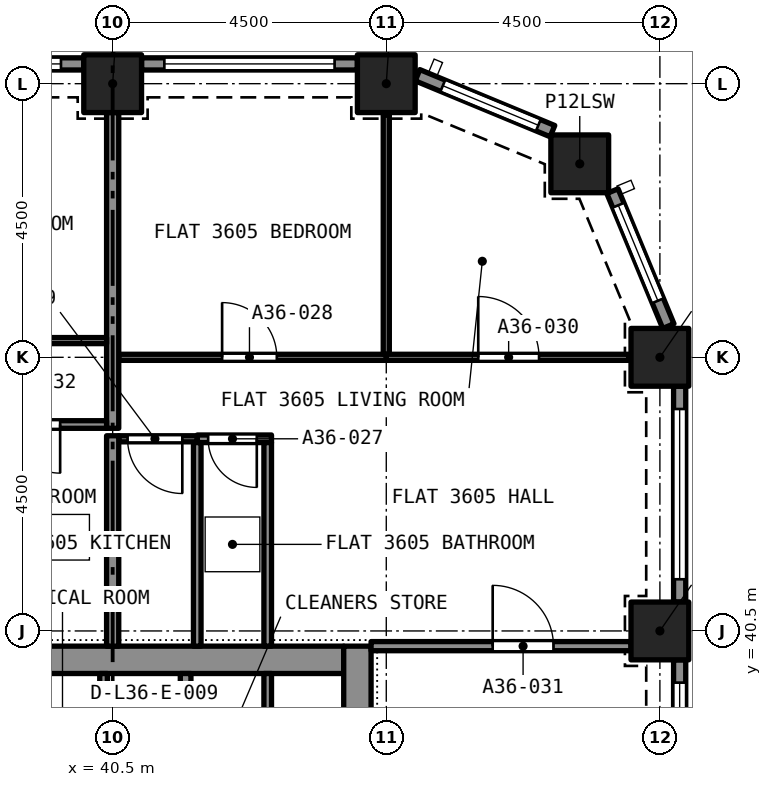
"""IFC4 building model, lengths in metres.
Left out: names, types, materials, properties, quantities, classifications, styles, units other than length and angle.
Written with IfcOpenShell. Run it as: python <this file> out.ifc"""

import sys

from ifc_helpers import new_model, si_unit, direction, frame, frame_2d, origin, origin_2d, place, context, subcontext, project, spatial, rectangle, extrude, element, fill, save


model = new_model("IFC4")
c1 = context("Model", 3, precision=1e-05, world=origin(), true_north=direction((0.0, 1.0)))
c2 = subcontext(c1, "Body", "Model", "MODEL_VIEW")
j1 = project(units=[si_unit("LENGTHUNIT", "METRE"), si_unit("PLANEANGLEUNIT", "RADIAN")], contexts=[c1])
p1 = place(None, origin())
s1 = spatial("IfcSite", under=j1, at=p1, CompositionType="ELEMENT")
p2 = place(p1, origin())
s2 = spatial("IfcBuilding", under=s1, at=p2, CompositionType="ELEMENT")
p3 = place(p2, frame((0.0, 0.0, 130.2)))
s3 = spatial("IfcBuildingStorey", under=s2, at=p3, CompositionType="ELEMENT", Elevation=130.2)
for number, where, z_axis, x_axis in (
    (1, (49.5, 40.5, 0.0), (0.0, 0.0, 1.0), (1.0, 0.0, 0.0)),
    (2, (49.5, 45.0, 0.0), (0.0, 0.0, 1.0), (1.0, 0.0, 0.0)),
    (3, (48.182, 48.182, 0.0), (0.0, 0.0, 1.0), (1.0, 0.0, 0.0)),
    (4, (40.5, 49.5, 0.0), (0.0, 0.0, 1.0), (1.0, 0.0, 0.0)),
    (5, (45.0, 49.5, 0.0), (0.0, 0.0, 1.0), (1.0, 0.0, 0.0)),
):
    element("IfcColumn", number, at=place(p3, frame(where, z_axis=z_axis, x_axis=x_axis)), inside=s3, PredefinedType="COLUMN", context=c2, shape_type="SweptSolid", body=[
        extrude(rectangle(XDim=0.95, YDim=0.95, at=origin_2d()), origin(), (0.0, 0.0, 1.0), 3.2),
    ])
p4 = place(p3, frame((36.7, 40.025, 0.0), z_axis=(0.0, 0.0, 1.0), x_axis=(1.0, 0.0, 0.0)))
e6 = element("IfcWall", 6, at=p4, inside=s3, PredefinedType="SOLIDWALL", context=c2, shape_type="SweptSolid", body=[
    extrude(rectangle(XDim=7.6, YDim=0.45, at=frame_2d((3.8, 0.0))), origin(), (0.0, 0.0, 1.0), 3.2),
])
p5 = place(p3, frame((44.525, 27.25, 0.0), z_axis=(0.0, 0.0, 1.0), x_axis=(0.0, 1.0, 0.0)))
e7 = element("IfcWall", 7, at=p5, inside=s3, PredefinedType="SOLIDWALL", context=c2, shape_type="SweptSolid", body=[
    extrude(rectangle(XDim=13.0, YDim=0.45, at=frame_2d((6.5, 0.0))), origin(), (0.0, 0.0, 1.0), 3.2),
])
p6 = place(p5, frame((8.7, 0.0, 0.0)))
e8 = element("IfcOpeningElement", 8, at=p6, cuts=e7, PredefinedType="OPENING", context=c2, shape_type="SweptSolid", body=[
    extrude(rectangle(XDim=1.2, YDim=2.1, at=frame_2d((0.6, 1.05))), frame((0.0, 0.235, 0.0), z_axis=(0.0, -1.0, 0.0), x_axis=(1.0, 0.0, 0.0)), (0.0, 0.0, 1.0), 0.47),
])
p7 = place(p3, frame((49.825, 40.025, 0.0), z_axis=(0.0, 0.0, 1.0), x_axis=(0.0, -1.0, 0.0)))
e9 = element("IfcWall", 9, at=p7, inside=s3, PredefinedType="SOLIDWALL", context=c2, shape_type="SweptSolid", body=[
    extrude(rectangle(XDim=3.55, YDim=0.2, at=frame_2d((1.775, 0.0))), origin(), (0.0, 0.0, 1.0), 3.2),
])
p8 = place(p7, frame((0.375, 0.0, 0.45)))
e10 = element("IfcOpeningElement", 10, at=p8, cuts=e9, PredefinedType="OPENING", context=c2, shape_type="SweptSolid", body=[
    extrude(rectangle(XDim=2.8, YDim=1.95, at=frame_2d((1.4, 0.975))), frame((0.0, 0.11, 0.0), z_axis=(0.0, -1.0, 0.0), x_axis=(1.0, 0.0, 0.0)), (0.0, 0.0, 1.0), 0.22),
])
p9 = place(p3, frame((49.825, 44.525, 0.0), z_axis=(0.0, 0.0, 1.0), x_axis=(0.0, -1.0, 0.0)))
e11 = element("IfcWall", 11, at=p9, inside=s3, PredefinedType="SOLIDWALL", context=c2, shape_type="SweptSolid", body=[
    extrude(rectangle(XDim=3.55, YDim=0.2, at=frame_2d((1.775, 0.0))), origin(), (0.0, 0.0, 1.0), 3.2),
])
p10 = place(p9, frame((0.375, 0.0, 0.45)))
e12 = element("IfcOpeningElement", 12, at=p10, cuts=e11, PredefinedType="OPENING", context=c2, shape_type="SweptSolid", body=[
    extrude(rectangle(XDim=2.8, YDim=1.95, at=frame_2d((1.4, 0.975))), frame((0.0, 0.11, 0.0), z_axis=(0.0, -1.0, 0.0), x_axis=(1.0, 0.0, 0.0)), (0.0, 0.0, 1.0), 0.22),
])
p11 = place(p3, frame((48.72, 47.733, 0.0), z_axis=(0.0, 0.0, 1.0), x_axis=(0.382680855588, -0.923880599843, 0.0)))
e13 = element("IfcWall", 13, at=p11, inside=s3, PredefinedType="SOLIDWALL", context=c2, shape_type="SweptSolid", body=[
    extrude(rectangle(XDim=2.403, YDim=0.2, at=frame_2d((1.201, 0.0))), origin(), (0.0, 0.0, 1.0), 3.2),
])
p12 = place(p11, frame((0.251, 0.0, 0.45)))
e14 = element("IfcOpeningElement", 14, at=p12, cuts=e13, PredefinedType="OPENING", context=c2, shape_type="SweptSolid", body=[
    extrude(rectangle(XDim=1.7, YDim=1.95, at=frame_2d((0.85, 0.975))), frame((0.0, 0.11, 0.0), z_axis=(0.0, -1.0, 0.0), x_axis=(1.0, 0.0, 0.0)), (0.0, 0.0, 1.0), 0.22),
])
p13 = place(p3, frame((45.513, 49.639, 0.0), z_axis=(0.0, 0.0, 1.0), x_axis=(0.923880599843, -0.382680855588, 0.0)))
e15 = element("IfcWall", 15, at=p13, inside=s3, PredefinedType="SOLIDWALL", context=c2, shape_type="SweptSolid", body=[
    extrude(rectangle(XDim=2.403, YDim=0.2, at=frame_2d((1.201, 0.0))), origin(), (0.0, 0.0, 1.0), 3.2),
])
p14 = place(p13, frame((0.451, 0.0, 0.45)))
e16 = element("IfcOpeningElement", 16, at=p14, cuts=e15, PredefinedType="OPENING", context=c2, shape_type="SweptSolid", body=[
    extrude(rectangle(XDim=1.7, YDim=1.95, at=frame_2d((0.85, 0.975))), frame((0.0, 0.11, 0.0), z_axis=(0.0, -1.0, 0.0), x_axis=(1.0, 0.0, 0.0)), (0.0, 0.0, 1.0), 0.22),
])
p15 = place(p3, frame((40.975, 49.825, 0.0), z_axis=(0.0, 0.0, 1.0), x_axis=(1.0, 0.0, 0.0)))
e17 = element("IfcWall", 17, at=p15, inside=s3, PredefinedType="SOLIDWALL", context=c2, shape_type="SweptSolid", body=[
    extrude(rectangle(XDim=3.55, YDim=0.2, at=frame_2d((1.775, 0.0))), origin(), (0.0, 0.0, 1.0), 3.2),
])
p16 = place(p15, frame((0.375, 0.0, 0.45)))
e18 = element("IfcOpeningElement", 18, at=p16, cuts=e17, PredefinedType="OPENING", context=c2, shape_type="SweptSolid", body=[
    extrude(rectangle(XDim=2.8, YDim=1.95, at=frame_2d((1.4, 0.975))), frame((0.0, 0.11, 0.0), z_axis=(0.0, -1.0, 0.0), x_axis=(1.0, 0.0, 0.0)), (0.0, 0.0, 1.0), 0.22),
])
p17 = place(p3, frame((36.475, 49.825, 0.0), z_axis=(0.0, 0.0, 1.0), x_axis=(1.0, 0.0, 0.0)))
e19 = element("IfcWall", 19, at=p17, inside=s3, PredefinedType="SOLIDWALL", context=c2, shape_type="SweptSolid", body=[
    extrude(rectangle(XDim=3.55, YDim=0.2, at=frame_2d((1.775, 0.0))), origin(), (0.0, 0.0, 1.0), 3.2),
])
p18 = place(p17, frame((0.375, 0.0, 0.45)))
e20 = element("IfcOpeningElement", 20, at=p18, cuts=e19, PredefinedType="OPENING", context=c2, shape_type="SweptSolid", body=[
    extrude(rectangle(XDim=2.8, YDim=1.95, at=frame_2d((1.4, 0.975))), frame((0.0, 0.11, 0.0), z_axis=(0.0, -1.0, 0.0), x_axis=(1.0, 0.0, 0.0)), (0.0, 0.0, 1.0), 0.22),
])
p19 = place(p3, frame((43.113, 43.66, 0.0), z_axis=(0.0, 0.0, 1.0), x_axis=(-1.0, 0.0, 0.0)))
e21 = element("IfcWall", 21, at=p19, inside=s3, PredefinedType="PARTITIONING", context=c2, shape_type="SweptSolid", body=[
    extrude(rectangle(XDim=1.222, YDim=0.125, at=frame_2d((0.611, 0.0))), origin(), (0.0, 0.0, 1.0), 2.9),
])
p20 = place(p19, frame((0.242, 0.0, 0.0)))
e22 = element("IfcOpeningElement", 22, at=p20, cuts=e21, PredefinedType="OPENING", context=c2, shape_type="SweptSolid", body=[
    extrude(rectangle(XDim=0.8, YDim=2.1, at=frame_2d((0.4, 1.05))), frame((0.0, 0.073, 0.0), z_axis=(0.0, -1.0, 0.0), x_axis=(1.0, 0.0, 0.0)), (0.0, 0.0, 1.0), 0.145),
])
for number, where, z_axis, x_axis in (
    (23, (43.05, 40.25, 0.0), (0.0, 0.0, 1.0), (0.0, 1.0, 0.0)),
    (24, (41.891, 40.25, 0.0), (0.0, 0.0, 1.0), (0.0, 1.0, 0.0)),
):
    element("IfcWall", number, at=place(p3, frame(where, z_axis=z_axis, x_axis=x_axis)), inside=s3, PredefinedType="PARTITIONING", context=c2, shape_type="SweptSolid", body=[
        extrude(rectangle(XDim=3.347, YDim=0.125, at=frame_2d((1.674, 0.0))), origin(), (0.0, 0.0, 1.0), 2.9),
    ])
p21 = place(p3, frame((40.6, 45.0, 0.0), z_axis=(0.0, 0.0, 1.0), x_axis=(1.0, 0.0, 0.0)))
e25 = element("IfcWall", 25, at=p21, inside=s3, PredefinedType="PARTITIONING", context=c2, shape_type="SweptSolid", body=[
    extrude(rectangle(XDim=4.4, YDim=0.1, at=frame_2d((2.2, 0.0))), origin(), (0.0, 0.0, 1.0), 2.9),
])
p22 = place(p21, frame((1.7, 0.0, 0.0)))
e26 = element("IfcOpeningElement", 26, at=p22, cuts=e25, PredefinedType="OPENING", context=c2, shape_type="SweptSolid", body=[
    extrude(rectangle(XDim=0.9, YDim=2.1, at=frame_2d((0.45, 1.05))), frame((0.0, 0.06, 0.0), z_axis=(0.0, -1.0, 0.0), x_axis=(1.0, 0.0, 0.0)), (0.0, 0.0, 1.0), 0.12),
])
p23 = place(p3, frame((45.0, 45.05, 0.0), z_axis=(0.0, 0.0, 1.0), x_axis=(0.0, 1.0, 0.0)))
e27 = element("IfcWall", 27, at=p23, inside=s3, PredefinedType="PARTITIONING", context=c2, shape_type="SweptSolid", body=[
    extrude(rectangle(XDim=3.936, YDim=0.1, at=frame_2d((1.968, 0.0))), origin(), (0.0, 0.0, 1.0), 2.9),
])
p24 = place(p3, frame((41.891, 43.66, 0.0), z_axis=(0.0, 0.0, 1.0), x_axis=(-1.0, 0.0, 0.0)))
e28 = element("IfcWall", 28, at=p24, inside=s3, PredefinedType="PARTITIONING", context=c2, shape_type="SweptSolid", body=[
    extrude(rectangle(XDim=1.291, YDim=0.1, at=frame_2d((0.646, 0.0))), origin(), (0.0, 0.0, 1.0), 2.9),
])
p25 = place(p24, frame((0.246, 0.0, 0.0)))
e29 = element("IfcOpeningElement", 29, at=p25, cuts=e28, PredefinedType="OPENING", context=c2, shape_type="SweptSolid", body=[
    extrude(rectangle(XDim=0.9, YDim=2.1, at=frame_2d((0.45, 1.05))), frame((0.0, 0.06, 0.0), z_axis=(0.0, -1.0, 0.0), x_axis=(1.0, 0.0, 0.0)), (0.0, 0.0, 1.0), 0.12),
])
p26 = place(p3, frame((45.0, 45.0, 0.0), z_axis=(0.0, 0.0, 1.0), x_axis=(1.0, 0.0, 0.0)))
e30 = element("IfcWall", 30, at=p26, inside=s3, PredefinedType="PARTITIONING", context=c2, shape_type="SweptSolid", body=[
    extrude(rectangle(XDim=3.986, YDim=0.1, at=frame_2d((1.993, 0.0))), origin(), (0.0, 0.0, 1.0), 2.9),
])
p27 = place(p26, frame((1.512, 0.0, 0.0)))
e31 = element("IfcOpeningElement", 31, at=p27, cuts=e30, PredefinedType="OPENING", context=c2, shape_type="SweptSolid", body=[
    extrude(rectangle(XDim=1.0, YDim=2.1, at=frame_2d((0.5, 1.05))), frame((0.0, 0.06, 0.0), z_axis=(0.0, -1.0, 0.0), x_axis=(1.0, 0.0, 0.0)), (0.0, 0.0, 1.0), 0.12),
])
p28 = place(p3, frame((40.5, 43.833, 0.0), z_axis=(0.0, 0.0, 1.0), x_axis=(0.0, 1.0, 0.0)))
e32 = element("IfcWall", 32, at=p28, inside=s3, PredefinedType="PARTITIONING", context=c2, shape_type="SweptSolid", body=[
    extrude(rectangle(XDim=5.192, YDim=0.2, at=frame_2d((2.596, 0.0))), origin(), (0.0, 0.0, 1.0), 2.9),
])
p29 = place(p3, frame((44.75, 40.25, 0.0), z_axis=(0.0, 0.0, 1.0), x_axis=(1.0, 0.0, 0.0)))
e33 = element("IfcWall", 33, at=p29, inside=s3, PredefinedType="PARTITIONING", context=c2, shape_type="SweptSolid", body=[
    extrude(rectangle(XDim=4.275, YDim=0.15, at=frame_2d((2.137, 0.0))), origin(), (0.0, 0.0, 1.0), 2.9),
])
p30 = place(p29, frame((2.0, 0.0, 0.0)))
e34 = element("IfcOpeningElement", 34, at=p30, cuts=e33, PredefinedType="OPENING", context=c2, shape_type="SweptSolid", body=[
    extrude(rectangle(XDim=1.0, YDim=2.1, at=frame_2d((0.5, 1.05))), frame((0.0, 0.085, 0.0), z_axis=(0.0, -1.0, 0.0), x_axis=(1.0, 0.0, 0.0)), (0.0, 0.0, 1.0), 0.17),
])
p31 = place(p3, frame((40.5, 40.25, 0.0), z_axis=(0.0, 0.0, 1.0), x_axis=(0.0, 1.0, 0.0)))
e35 = element("IfcWall", 35, at=p31, inside=s3, PredefinedType="PARTITIONING", context=c2, shape_type="SweptSolid", body=[
    extrude(rectangle(XDim=3.46, YDim=0.2, at=frame_2d((1.73, 0.0))), origin(), (0.0, 0.0, 1.0), 2.9),
])
p32 = place(p3, frame((40.4, 43.895, 0.0), z_axis=(0.0, 0.0, 1.0), x_axis=(-1.0, 0.0, 0.0)))
e36 = element("IfcWall", 36, at=p32, inside=s3, PredefinedType="PARTITIONING", context=c2, shape_type="SweptSolid", body=[
    extrude(rectangle(XDim=2.427, YDim=0.125, at=frame_2d((1.214, 0.0))), origin(), (0.0, 0.0, 1.0), 2.9),
])
p33 = place(p32, frame((0.764, 0.0, 0.0)))
e37 = element("IfcOpeningElement", 37, at=p33, cuts=e36, PredefinedType="OPENING", context=c2, shape_type="SweptSolid", body=[
    extrude(rectangle(XDim=0.8, YDim=2.1, at=frame_2d((0.4, 1.05))), frame((0.0, 0.073, 0.0), z_axis=(0.0, -1.0, 0.0), x_axis=(1.0, 0.0, 0.0)), (0.0, 0.0, 1.0), 0.145),
])
p34 = place(p3, frame((36.0, 45.275, 0.0), z_axis=(0.0, 0.0, 1.0), x_axis=(1.0, 0.0, 0.0)))
e38 = element("IfcWall", 38, at=p34, inside=s3, PredefinedType="PARTITIONING", context=c2, shape_type="SweptSolid", body=[
    extrude(rectangle(XDim=4.4, YDim=0.1, at=frame_2d((2.2, 0.0))), origin(), (0.0, 0.0, 1.0), 2.9),
])
p35 = place(p34, frame((1.8, 0.0, 0.0)))
e39 = element("IfcOpeningElement", 39, at=p35, cuts=e38, PredefinedType="OPENING", context=c2, shape_type="SweptSolid", body=[
    extrude(rectangle(XDim=0.9, YDim=2.1, at=frame_2d((0.45, 1.05))), frame((0.0, 0.06, 0.0), z_axis=(0.0, -1.0, 0.0), x_axis=(1.0, 0.0, 0.0)), (0.0, 0.0, 1.0), 0.12),
])
p36 = place(p3, frame((41.7, 37.5, 0.0), z_axis=(0.0, 0.0, 1.0), x_axis=(0.0, 1.0, 0.0)))
e40 = element("IfcWall", 40, at=p36, inside=s3, PredefinedType="SOLIDWALL", context=c2, shape_type="SweptSolid", body=[
    extrude(rectangle(XDim=2.3, YDim=0.175, at=frame_2d((1.15, 0.0))), origin(), (0.0, 0.0, 1.0), 2.9),
])
for number, where, z_axis, x_axis in (
    (41, (43.05, 37.5, 0.0), (0.0, 0.0, 1.0), (0.0, 1.0, 0.0)),
    (42, (40.35, 37.5, 0.0), (0.0, 0.0, 1.0), (0.0, 1.0, 0.0)),
):
    element("IfcWall", number, at=place(p3, frame(where, z_axis=z_axis, x_axis=x_axis)), inside=s3, PredefinedType="PARTITIONING", context=c2, shape_type="SweptSolid", body=[
        extrude(rectangle(XDim=2.3, YDim=0.125, at=frame_2d((1.15, 0.0))), origin(), (0.0, 0.0, 1.0), 2.9),
    ])
p37 = place(p8, origin())
e43 = element("IfcWindow", 43, at=p37, inside=s3, PartitioningType="SINGLE_PANEL", PredefinedType="WINDOW", context=c2, shape_type="SweptSolid", body=[
    extrude(rectangle(XDim=2.8, YDim=1.95, at=frame_2d((1.4, 0.975))), frame((0.0, 0.03, 0.0), z_axis=(0.0, -1.0, 0.0), x_axis=(1.0, 0.0, 0.0)), (0.0, 0.0, 1.0), 0.06),
])
fill(e10, e43)
p38 = place(p10, origin())
e44 = element("IfcWindow", 44, at=p38, inside=s3, PartitioningType="SINGLE_PANEL", PredefinedType="WINDOW", context=c2, shape_type="SweptSolid", body=[
    extrude(rectangle(XDim=2.8, YDim=1.95, at=frame_2d((1.4, 0.975))), frame((0.0, 0.03, 0.0), z_axis=(0.0, -1.0, 0.0), x_axis=(1.0, 0.0, 0.0)), (0.0, 0.0, 1.0), 0.06),
])
fill(e12, e44)
p39 = place(p12, origin())
e45 = element("IfcWindow", 45, at=p39, inside=s3, PartitioningType="SINGLE_PANEL", PredefinedType="WINDOW", context=c2, shape_type="SweptSolid", body=[
    extrude(rectangle(XDim=1.7, YDim=1.95, at=frame_2d((0.85, 0.975))), frame((0.0, 0.03, 0.0), z_axis=(0.0, -1.0, 0.0), x_axis=(1.0, 0.0, 0.0)), (0.0, 0.0, 1.0), 0.06),
])
fill(e14, e45)
p40 = place(p14, origin())
e46 = element("IfcWindow", 46, at=p40, inside=s3, PartitioningType="SINGLE_PANEL", PredefinedType="WINDOW", context=c2, shape_type="SweptSolid", body=[
    extrude(rectangle(XDim=1.7, YDim=1.95, at=frame_2d((0.85, 0.975))), frame((0.0, 0.03, 0.0), z_axis=(0.0, -1.0, 0.0), x_axis=(1.0, 0.0, 0.0)), (0.0, 0.0, 1.0), 0.06),
])
fill(e16, e46)
p41 = place(p16, origin())
e47 = element("IfcWindow", 47, at=p41, inside=s3, PartitioningType="SINGLE_PANEL", PredefinedType="WINDOW", context=c2, shape_type="SweptSolid", body=[
    extrude(rectangle(XDim=2.8, YDim=1.95, at=frame_2d((1.4, 0.975))), frame((0.0, 0.03, 0.0), z_axis=(0.0, -1.0, 0.0), x_axis=(1.0, 0.0, 0.0)), (0.0, 0.0, 1.0), 0.06),
])
fill(e18, e47)
p42 = place(p18, origin())
e48 = element("IfcWindow", 48, at=p42, inside=s3, PartitioningType="SINGLE_PANEL", PredefinedType="WINDOW", context=c2, shape_type="SweptSolid", body=[
    extrude(rectangle(XDim=2.8, YDim=1.95, at=frame_2d((1.4, 0.975))), frame((0.0, 0.03, 0.0), z_axis=(0.0, -1.0, 0.0), x_axis=(1.0, 0.0, 0.0)), (0.0, 0.0, 1.0), 0.06),
])
fill(e20, e48)
p43 = place(p20, origin())
e49 = element("IfcDoor", 49, at=p43, inside=s3, OperationType="SINGLE_SWING_RIGHT", PredefinedType="DOOR", context=c2, shape_type="SweptSolid", body=[
    extrude(rectangle(XDim=0.8, YDim=2.1, at=frame_2d((0.4, 1.05))), frame((0.0, 0.025, 0.0), z_axis=(0.0, -1.0, 0.0), x_axis=(1.0, 0.0, 0.0)), (0.0, 0.0, 1.0), 0.05),
])
fill(e22, e49)
p44 = place(p22, origin())
e50 = element("IfcDoor", 50, at=p44, inside=s3, OperationType="SINGLE_SWING_LEFT", PredefinedType="DOOR", context=c2, shape_type="SweptSolid", body=[
    extrude(rectangle(XDim=0.9, YDim=2.1, at=frame_2d((0.45, 1.05))), frame((0.0, 0.025, 0.0), z_axis=(0.0, -1.0, 0.0), x_axis=(1.0, 0.0, 0.0)), (0.0, 0.0, 1.0), 0.05),
])
fill(e26, e50)
p45 = place(p25, origin())
e51 = element("IfcDoor", 51, at=p45, inside=s3, OperationType="SINGLE_SWING_RIGHT", PredefinedType="DOOR", context=c2, shape_type="SweptSolid", body=[
    extrude(rectangle(XDim=0.9, YDim=2.1, at=frame_2d((0.45, 1.05))), frame((0.0, 0.025, 0.0), z_axis=(0.0, -1.0, 0.0), x_axis=(1.0, 0.0, 0.0)), (0.0, 0.0, 1.0), 0.05),
])
fill(e29, e51)
p46 = place(p27, origin())
e52 = element("IfcDoor", 52, at=p46, inside=s3, OperationType="SINGLE_SWING_RIGHT", PredefinedType="DOOR", context=c2, shape_type="SweptSolid", body=[
    extrude(rectangle(XDim=1.0, YDim=2.1, at=frame_2d((0.5, 1.05))), frame((0.0, 0.025, 0.0), z_axis=(0.0, -1.0, 0.0), x_axis=(1.0, 0.0, 0.0)), (0.0, 0.0, 1.0), 0.05),
])
fill(e31, e52)
p47 = place(p30, origin())
e53 = element("IfcDoor", 53, at=p47, inside=s3, OperationType="SINGLE_SWING_RIGHT", PredefinedType="DOOR", context=c2, shape_type="SweptSolid", body=[
    extrude(rectangle(XDim=1.0, YDim=2.1, at=frame_2d((0.5, 1.05))), frame((0.0, 0.025, 0.0), z_axis=(0.0, -1.0, 0.0), x_axis=(1.0, 0.0, 0.0)), (0.0, 0.0, 1.0), 0.05),
])
fill(e34, e53)
p48 = place(p33, origin())
e54 = element("IfcDoor", 54, at=p48, inside=s3, OperationType="SINGLE_SWING_LEFT", PredefinedType="DOOR", context=c2, shape_type="SweptSolid", body=[
    extrude(rectangle(XDim=0.8, YDim=2.1, at=frame_2d((0.4, 1.05))), frame((0.0, 0.025, 0.0), z_axis=(0.0, -1.0, 0.0), x_axis=(1.0, 0.0, 0.0)), (0.0, 0.0, 1.0), 0.05),
])
fill(e37, e54)
save(model, sys.argv[1])
